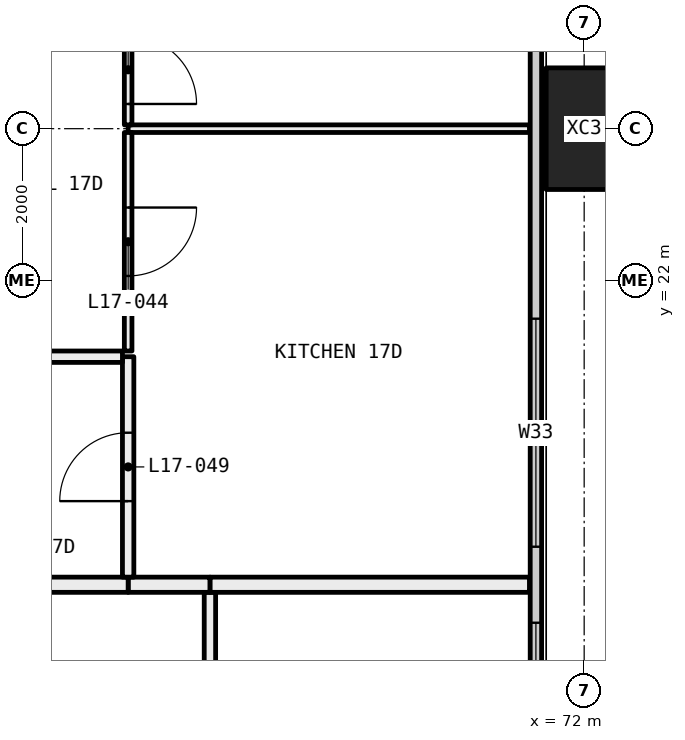
"""IFC4 building model, lengths in metres.
Left out: names, types, materials, properties, quantities, classifications, styles, units other than length and angle.
Written with IfcOpenShell. Run it as: python <this file> out.ifc"""

import sys

from ifc_helpers import new_model, si_unit, direction, frame, frame_2d, origin, origin_2d, place, context, subcontext, project, spatial, rectangle, hollow_rectangle, extrude, element, fill, save


model = new_model("IFC4")
c1 = context("Model", 3, precision=1e-05, world=origin(), true_north=direction((0.0, 1.0)))
c2 = subcontext(c1, "Body", "Model", "MODEL_VIEW")
j1 = project(units=[si_unit("LENGTHUNIT", "METRE"), si_unit("PLANEANGLEUNIT", "RADIAN")], contexts=[c1])
p1 = place(None, origin())
s1 = spatial("IfcSite", under=j1, at=p1, CompositionType="ELEMENT")
p2 = place(p1, origin())
s2 = spatial("IfcBuilding", under=s1, at=p2, CompositionType="ELEMENT")
p3 = place(p2, frame((0.0, 0.0, 71.4)))
s3 = spatial("IfcBuildingStorey", under=s2, at=p3, CompositionType="ELEMENT", Elevation=71.4)
p4 = place(p3, frame((72.0, 24.0, -0.4), z_axis=(0.0, 0.0, 1.0), x_axis=(0.0, 1.0, 0.0)))
e1 = element("IfcColumn", 1, at=p4, inside=s3, PredefinedType="COLUMN", context=c2, shape_type="SweptSolid", body=[
    extrude(hollow_rectangle(XDim=1.6, YDim=1.0, WallThickness=0.065, at=origin_2d()), origin(), (0.0, 0.0, 1.0), 3.45),
])
p5 = place(p3, frame((71.365, 6.71, 0.0), z_axis=(0.0, 0.0, 1.0), x_axis=(0.0, 1.0, 0.0)))
e2 = element("IfcWall", 2, at=p5, inside=s3, PredefinedType="ELEMENTEDWALL", context=c2, shape_type="SweptSolid", body=[
    extrude(rectangle(XDim=34.58, YDim=0.15, at=frame_2d((17.29, 0.0))), origin(), (0.0, 0.0, 1.0), 3.05),
])
p6 = place(p5, frame((0.29, 0.0, 0.45)))
e3 = element("IfcOpeningElement", 3, at=p6, cuts=e2, PredefinedType="OPENING", context=c2, shape_type="SweptSolid", body=[
    extrude(rectangle(XDim=4.5, YDim=2.55, at=frame_2d((2.25, 1.275))), frame((0.0, 0.085, 0.0), z_axis=(0.0, -1.0, 0.0), x_axis=(1.0, 0.0, 0.0)), (0.0, 0.0, 1.0), 0.17),
])
p7 = place(p5, frame((7.79, 0.0, 0.45)))
e4 = element("IfcOpeningElement", 4, at=p7, cuts=e2, PredefinedType="OPENING", context=c2, shape_type="SweptSolid", body=[
    extrude(rectangle(XDim=3.0, YDim=2.55, at=frame_2d((1.5, 1.275))), frame((0.0, 0.085, 0.0), z_axis=(0.0, -1.0, 0.0), x_axis=(1.0, 0.0, 0.0)), (0.0, 0.0, 1.0), 0.17),
])
p8 = place(p5, frame((11.79, 0.0, 0.45)))
e5 = element("IfcOpeningElement", 5, at=p8, cuts=e2, PredefinedType="OPENING", context=c2, shape_type="SweptSolid", body=[
    extrude(rectangle(XDim=3.0, YDim=2.55, at=frame_2d((1.5, 1.275))), frame((0.0, 0.085, 0.0), z_axis=(0.0, -1.0, 0.0), x_axis=(1.0, 0.0, 0.0)), (0.0, 0.0, 1.0), 0.17),
])
p9 = place(p5, frame((19.79, 0.0, 0.45)))
e6 = element("IfcOpeningElement", 6, at=p9, cuts=e2, PredefinedType="OPENING", context=c2, shape_type="SweptSolid", body=[
    extrude(rectangle(XDim=3.0, YDim=2.55, at=frame_2d((1.5, 1.275))), frame((0.0, 0.085, 0.0), z_axis=(0.0, -1.0, 0.0), x_axis=(1.0, 0.0, 0.0)), (0.0, 0.0, 1.0), 0.17),
])
p10 = place(p5, frame((23.79, 0.0, 0.45)))
e7 = element("IfcOpeningElement", 7, at=p10, cuts=e2, PredefinedType="OPENING", context=c2, shape_type="SweptSolid", body=[
    extrude(rectangle(XDim=2.0, YDim=2.55, at=frame_2d((1.0, 1.275))), frame((0.0, 0.085, 0.0), z_axis=(0.0, -1.0, 0.0), x_axis=(1.0, 0.0, 0.0)), (0.0, 0.0, 1.0), 0.17),
])
p11 = place(p5, frame((29.79, 0.0, 0.45)))
e8 = element("IfcOpeningElement", 8, at=p11, cuts=e2, PredefinedType="OPENING", context=c2, shape_type="SweptSolid", body=[
    extrude(rectangle(XDim=4.5, YDim=2.55, at=frame_2d((2.25, 1.275))), frame((0.0, 0.085, 0.0), z_axis=(0.0, -1.0, 0.0), x_axis=(1.0, 0.0, 0.0)), (0.0, 0.0, 1.0), 0.17),
])
p12 = place(p3, frame((67.076, 17.9, 0.0), z_axis=(0.0, 0.0, 1.0), x_axis=(0.0, -1.0, 0.0)))
e9 = element("IfcWall", 9, at=p12, inside=s3, PredefinedType="PARTITIONING", context=c2, shape_type="SweptSolid", body=[
    extrude(rectangle(XDim=5.825, YDim=0.15, at=frame_2d((2.913, 0.0))), origin(), (0.0, 0.0, 1.0), 2.45),
])
p13 = place(p3, frame((71.28, 18.0, 0.0), z_axis=(0.0, 0.0, 1.0), x_axis=(-1.0, 0.0, 0.0)))
e10 = element("IfcWall", 10, at=p13, inside=s3, PredefinedType="PARTITIONING", context=c2, shape_type="SweptSolid", body=[
    extrude(rectangle(XDim=4.204, YDim=0.2, at=frame_2d((2.102, 0.0))), origin(), (0.0, 0.0, 1.0), 3.05),
])
p14 = place(p3, frame((67.076, 18.0, 0.0), z_axis=(0.0, 0.0, 1.0), x_axis=(-1.0, 0.0, 0.0)))
e11 = element("IfcWall", 11, at=p14, inside=s3, PredefinedType="PARTITIONING", context=c2, shape_type="SweptSolid", body=[
    extrude(rectangle(XDim=1.076, YDim=0.2, at=frame_2d((0.538, 0.0))), origin(), (0.0, 0.0, 1.0), 3.05),
])
p15 = place(p3, frame((66.0, 18.0, 0.0), z_axis=(0.0, 0.0, 1.0), x_axis=(-1.0, 0.0, 0.0)))
e12 = element("IfcWall", 12, at=p15, inside=s3, PredefinedType="PARTITIONING", context=c2, shape_type="SweptSolid", body=[
    extrude(rectangle(XDim=1.5, YDim=0.2, at=frame_2d((0.75, 0.0))), origin(), (0.0, 0.0, 1.0), 3.05),
])
p16 = place(p3, frame((71.28, 24.0, 0.0), z_axis=(0.0, 0.0, 1.0), x_axis=(-1.0, 0.0, 0.0)))
e13 = element("IfcWall", 13, at=p16, inside=s3, PredefinedType="PARTITIONING", context=c2, shape_type="SweptSolid", body=[
    extrude(rectangle(XDim=5.28, YDim=0.1, at=frame_2d((2.64, 0.0))), origin(), (0.0, 0.0, 1.0), 2.45),
])
p17 = place(p3, frame((66.0, 21.0, 0.0), z_axis=(0.0, 0.0, 1.0), x_axis=(0.0, -1.0, 0.0)))
e14 = element("IfcWall", 14, at=p17, inside=s3, PredefinedType="PARTITIONING", context=c2, shape_type="SweptSolid", body=[
    extrude(rectangle(XDim=2.9, YDim=0.15, at=frame_2d((1.45, 0.0))), origin(), (0.0, 0.0, 1.0), 3.05),
])
p18 = place(p17, frame((1.0, 0.0, 0.0)))
e15 = element("IfcOpeningElement", 15, at=p18, cuts=e14, PredefinedType="OPENING", context=c2, shape_type="SweptSolid", body=[
    extrude(rectangle(XDim=0.9, YDim=2.1, at=frame_2d((0.45, 1.05))), frame((0.0, 0.085, 0.0), z_axis=(0.0, -1.0, 0.0), x_axis=(1.0, 0.0, 0.0)), (0.0, 0.0, 1.0), 0.17),
])
p19 = place(p3, frame((66.0, 23.95, 0.0), z_axis=(0.0, 0.0, 1.0), x_axis=(0.0, -1.0, 0.0)))
e16 = element("IfcWall", 16, at=p19, inside=s3, PredefinedType="PARTITIONING", context=c2, shape_type="SweptSolid", body=[
    extrude(rectangle(XDim=2.875, YDim=0.1, at=frame_2d((1.438, 0.0))), origin(), (0.0, 0.0, 1.0), 2.45),
])
p20 = place(p19, frame((0.988, 0.0, 0.0)))
e17 = element("IfcOpeningElement", 17, at=p20, cuts=e16, PredefinedType="OPENING", context=c2, shape_type="SweptSolid", body=[
    extrude(rectangle(XDim=0.9, YDim=2.1, at=frame_2d((0.45, 1.05))), frame((0.0, 0.06, 0.0), z_axis=(0.0, -1.0, 0.0), x_axis=(1.0, 0.0, 0.0)), (0.0, 0.0, 1.0), 0.12),
])
p21 = place(p3, frame((66.0, 25.5, 0.0), z_axis=(0.0, 0.0, 1.0), x_axis=(0.0, -1.0, 0.0)))
e18 = element("IfcWall", 18, at=p21, inside=s3, PredefinedType="PARTITIONING", context=c2, shape_type="SweptSolid", body=[
    extrude(rectangle(XDim=1.45, YDim=0.1, at=frame_2d((0.725, 0.0))), origin(), (0.0, 0.0, 1.0), 2.45),
])
p22 = place(p21, frame((0.275, 0.0, 0.0)))
e19 = element("IfcOpeningElement", 19, at=p22, cuts=e18, PredefinedType="OPENING", context=c2, shape_type="SweptSolid", body=[
    extrude(rectangle(XDim=0.9, YDim=2.1, at=frame_2d((0.45, 1.05))), frame((0.0, 0.06, 0.0), z_axis=(0.0, -1.0, 0.0), x_axis=(1.0, 0.0, 0.0)), (0.0, 0.0, 1.0), 0.12),
])
p23 = place(p3, frame((65.925, 21.0, 0.0), z_axis=(0.0, 0.0, 1.0), x_axis=(-1.0, 0.0, 0.0)))
e20 = element("IfcWall", 20, at=p23, inside=s3, PredefinedType="PARTITIONING", context=c2, shape_type="SweptSolid", body=[
    extrude(rectangle(XDim=2.15, YDim=0.15, at=frame_2d((1.075, 0.0))), origin(), (0.0, 0.0, 1.0), 3.05),
])
p24 = place(p7, origin())
e21 = element("IfcWindow", 21, at=p24, inside=s3, PartitioningType="SINGLE_PANEL", PredefinedType="WINDOW", context=c2, shape_type="SweptSolid", body=[
    extrude(rectangle(XDim=3.0, YDim=2.55, at=frame_2d((1.5, 1.275))), frame((0.0, 0.03, 0.0), z_axis=(0.0, -1.0, 0.0), x_axis=(1.0, 0.0, 0.0)), (0.0, 0.0, 1.0), 0.06),
])
fill(e4, e21)
p25 = place(p8, origin())
e22 = element("IfcWindow", 22, at=p25, inside=s3, PartitioningType="SINGLE_PANEL", PredefinedType="WINDOW", context=c2, shape_type="SweptSolid", body=[
    extrude(rectangle(XDim=3.0, YDim=2.55, at=frame_2d((1.5, 1.275))), frame((0.0, 0.03, 0.0), z_axis=(0.0, -1.0, 0.0), x_axis=(1.0, 0.0, 0.0)), (0.0, 0.0, 1.0), 0.06),
])
fill(e5, e22)
p26 = place(p20, origin())
e23 = element("IfcDoor", 23, at=p26, inside=s3, OperationType="SINGLE_SWING_RIGHT", PredefinedType="DOOR", context=c2, shape_type="SweptSolid", body=[
    extrude(rectangle(XDim=0.9, YDim=2.1, at=frame_2d((0.45, 1.05))), frame((0.0, 0.025, 0.0), z_axis=(0.0, -1.0, 0.0), x_axis=(1.0, 0.0, 0.0)), (0.0, 0.0, 1.0), 0.05),
])
fill(e17, e23)
p27 = place(p22, origin())
e24 = element("IfcDoor", 24, at=p27, inside=s3, OperationType="SINGLE_SWING_LEFT", PredefinedType="DOOR", context=c2, shape_type="SweptSolid", body=[
    extrude(rectangle(XDim=0.9, YDim=2.1, at=frame_2d((0.45, 1.05))), frame((0.0, 0.025, 0.0), z_axis=(0.0, -1.0, 0.0), x_axis=(1.0, 0.0, 0.0)), (0.0, 0.0, 1.0), 0.05),
])
fill(e19, e24)
p28 = place(p18, frame((0.9, 0.0, 0.0), x_axis=(-1.0, 0.0, 0.0)))
e25 = element("IfcDoor", 25, at=p28, inside=s3, OperationType="SINGLE_SWING_RIGHT", PredefinedType="DOOR", context=c2, shape_type="SweptSolid", body=[
    extrude(rectangle(XDim=0.9, YDim=2.1, at=frame_2d((0.45, 1.05))), frame((0.0, 0.025, 0.0), z_axis=(0.0, -1.0, 0.0), x_axis=(1.0, 0.0, 0.0)), (0.0, 0.0, 1.0), 0.05),
])
fill(e15, e25)
save(model, sys.argv[1])
